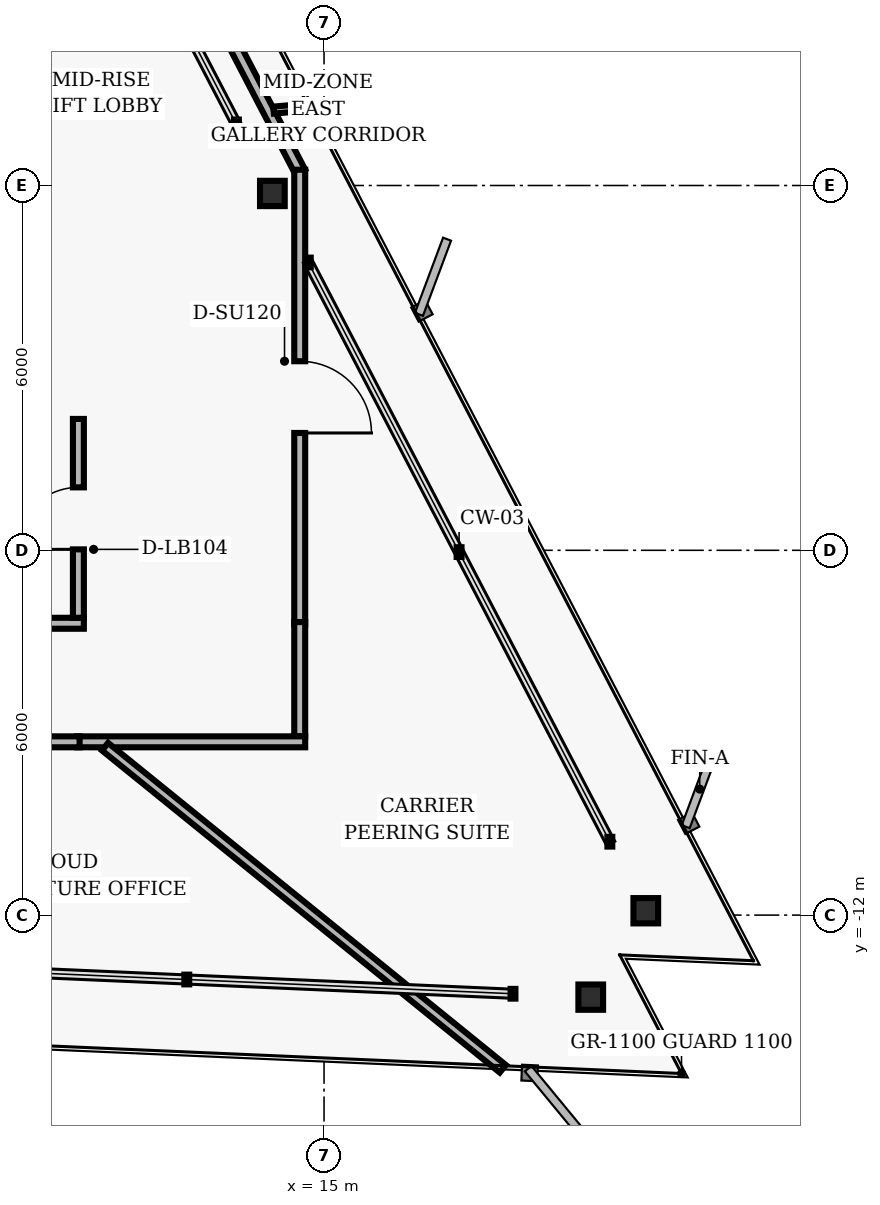
"""IFC4 building model, lengths in metres.
Left out: names, types, materials, properties, quantities, classifications, styles, units other than length and angle.
Written with IfcOpenShell. Run it as: python <this file> out.ifc"""

import sys

from ifc_helpers import new_model, si_unit, direction, frame, frame_2d, origin, origin_2d, place, context, subcontext, project, spatial, rectangle, i_section, extrude, element, fill, save


model = new_model("IFC4")
c1 = context("Model", 3, precision=1e-05, world=origin(), true_north=direction((0.0, 1.0)))
c2 = subcontext(c1, "Body", "Model", "MODEL_VIEW")
j1 = project(units=[si_unit("LENGTHUNIT", "METRE"), si_unit("PLANEANGLEUNIT", "RADIAN")], contexts=[c1])
p1 = place(None, origin())
s1 = spatial("IfcSite", under=j1, at=p1, CompositionType="ELEMENT")
p2 = place(p1, origin())
s2 = spatial("IfcBuilding", under=s1, at=p2, CompositionType="ELEMENT")
p3 = place(p2, frame((0.0, 0.0, 132.0)))
s3 = spatial("IfcBuildingStorey", under=s2, at=p3, CompositionType="ELEMENT", Elevation=132.0)
for number, where, z_axis, x_axis in (
    (1, (20.292, -11.928, 0.0), (0.0, 0.0, 1.0), (1.0, 0.0, 0.0)),
    (2, (14.15, -0.131, 0.0), (0.0, 0.0, 1.0), (1.0, 0.0, 0.0)),
    (3, (19.386, -13.349, 0.0), (0.0, 0.0, 1.0), (1.0, 0.0, 0.0)),
):
    element("IfcColumn", number, at=place(p3, frame(where, z_axis=z_axis, x_axis=x_axis)), inside=s3, PredefinedType="COLUMN", context=c2, shape_type="SweptSolid", body=[
        extrude(i_section(OverallWidth=0.406, OverallDepth=0.416, WebThickness=0.03, FlangeThickness=0.048, FilletRadius=0.02, at=origin_2d()), origin(), (0.0, 0.0, 1.0), 3.04),
    ])
p4 = place(p3, frame((10.003, 9.07, 0.0), z_axis=(0.0, 0.0, 1.0), x_axis=(0.461740291408, -0.887015165198, 0.0)))
e4 = element("IfcWall", 4, at=p4, inside=s3, PredefinedType="PARTITIONING", context=c2, shape_type="SweptSolid", body=[
    extrude(rectangle(XDim=9.976, YDim=0.18, at=frame_2d((4.988, 0.0))), origin(), (0.0, 0.0, 1.0), 2.763),
])
p5 = place(p3, frame((14.6, 0.26, 0.0), z_axis=(0.0, 0.0, 1.0), x_axis=(0.0, -1.0, 0.0)))
e5 = element("IfcWall", 5, at=p5, inside=s3, PredefinedType="PARTITIONING", context=c2, shape_type="SweptSolid", body=[
    extrude(rectangle(XDim=7.479, YDim=0.18, at=frame_2d((3.74, 0.0))), origin(), (0.0, 0.0, 1.0), 2.763),
])
p6 = place(p5, frame((3.15, 0.0, 0.0)))
e6 = element("IfcOpeningElement", 6, at=p6, cuts=e5, PredefinedType="OPENING", context=c2, shape_type="SweptSolid", body=[
    extrude(rectangle(XDim=1.18, YDim=2.02, at=frame_2d((0.59, 1.01))), frame((0.0, 0.1, 0.0), z_axis=(0.0, -1.0, 0.0), x_axis=(1.0, 0.0, 0.0)), (0.0, 0.0, 1.0), 0.2),
])
p7 = place(p3, frame((14.6, -7.18, 0.0), z_axis=(0.0, 0.0, 1.0), x_axis=(0.0, -1.0, 0.0)))
e7 = element("IfcWall", 7, at=p7, inside=s3, PredefinedType="PARTITIONING", context=c2, shape_type="SweptSolid", body=[
    extrude(rectangle(XDim=1.88, YDim=0.18, at=frame_2d((0.94, 0.0))), origin(), (0.0, 0.0, 1.0), 2.763),
])
p8 = place(p3, frame((14.69, -9.15, 0.0), z_axis=(0.0, 0.0, 1.0), x_axis=(-1.0, 0.0, 0.0)))
e8 = element("IfcWall", 8, at=p8, inside=s3, PredefinedType="PARTITIONING", context=c2, shape_type="SweptSolid", body=[
    extrude(rectangle(XDim=3.75, YDim=0.18, at=frame_2d((1.875, 0.0))), origin(), (0.0, 0.0, 1.0), 2.33),
])
p9 = place(p3, frame((10.98, -9.15, 0.0), z_axis=(0.0, 0.0, 1.0), x_axis=(-1.0, 0.0, 0.0)))
e9 = element("IfcWall", 9, at=p9, inside=s3, PredefinedType="PARTITIONING", context=c2, shape_type="SweptSolid", body=[
    extrude(rectangle(XDim=17.5, YDim=0.18, at=frame_2d((8.75, 0.0))), origin(), (0.0, 0.0, 1.0), 2.33),
])
p10 = place(p9, frame((13.116, 0.0, 0.0)))
e10 = element("IfcOpeningElement", 10, at=p10, cuts=e9, PredefinedType="OPENING", context=c2, shape_type="SweptSolid", body=[
    extrude(rectangle(XDim=1.18, YDim=2.02, at=frame_2d((0.59, 1.01))), frame((0.0, 0.1, 0.0), z_axis=(0.0, -1.0, 0.0), x_axis=(1.0, 0.0, 0.0)), (0.0, 0.0, 1.0), 0.2),
])
p11 = place(p9, frame((4.736, 0.0, 0.0)))
e11 = element("IfcOpeningElement", 11, at=p11, cuts=e9, PredefinedType="OPENING", context=c2, shape_type="SweptSolid", body=[
    extrude(rectangle(XDim=0.96, YDim=2.02, at=frame_2d((0.48, 1.01))), frame((0.0, 0.1, 0.0), z_axis=(0.0, -1.0, 0.0), x_axis=(1.0, 0.0, 0.0)), (0.0, 0.0, 1.0), 0.2),
])
p12 = place(p3, frame((5.53, -7.2, 0.0), z_axis=(0.0, 0.0, 1.0), x_axis=(1.0, 0.0, 0.0)))
e12 = element("IfcWall", 12, at=p12, inside=s3, PredefinedType="PARTITIONING", context=c2, shape_type="SweptSolid", body=[
    extrude(rectangle(XDim=5.52, YDim=0.18, at=frame_2d((2.76, 0.0))), origin(), (0.0, 0.0, 1.0), 2.33),
])
p13 = place(p3, frame((10.96, -7.11, 0.0), z_axis=(0.0, 0.0, 1.0), x_axis=(0.0, 1.0, 0.0)))
e13 = element("IfcWall", 13, at=p13, inside=s3, PredefinedType="PARTITIONING", context=c2, shape_type="SweptSolid", body=[
    extrude(rectangle(XDim=3.271, YDim=0.18, at=frame_2d((1.635, 0.0))), origin(), (0.0, 0.0, 1.0), 2.763),
])
p14 = place(p13, frame((1.125, 0.0, 0.0)))
e14 = element("IfcOpeningElement", 14, at=p14, cuts=e13, PredefinedType="OPENING", context=c2, shape_type="SweptSolid", body=[
    extrude(rectangle(XDim=1.02, YDim=2.02, at=frame_2d((0.51, 1.01))), frame((0.0, 0.1, 0.0), z_axis=(0.0, -1.0, 0.0), x_axis=(1.0, 0.0, 0.0)), (0.0, 0.0, 1.0), 0.2),
])
p15 = place(p3, frame((11.398, -9.23, 0.0), z_axis=(0.0, 0.0, 1.0), x_axis=(0.777150974354, -0.629314200588, 0.0)))
e15 = element("IfcWall", 15, at=p15, inside=s3, PredefinedType="PARTITIONING", context=c2, shape_type="SweptSolid", body=[
    extrude(rectangle(XDim=8.417, YDim=0.16, at=frame_2d((4.208, 0.0))), origin(), (0.0, 0.0, 1.0), 2.763),
])
p16 = place(p3, frame((14.169, 1.24, 0.0), z_axis=(0.0, 0.0, 1.0), x_axis=(0.996194547312, 0.08715746615, 0.0)))
e16 = element("IfcWall", 16, at=p16, inside=s3, PredefinedType="MOVABLE", context=c2, shape_type="SweptSolid", body=[
    extrude(rectangle(XDim=0.639, YDim=0.115, at=frame_2d((0.319, 0.0))), origin(), (0.0, 0.0, 1.0), 2.763),
])
p17 = place(p14, origin())
e17 = element("IfcDoor", 17, at=p17, inside=s3, OperationType="SINGLE_SWING_LEFT", PredefinedType="DOOR", context=c2, shape_type="SweptSolid", body=[
    extrude(rectangle(XDim=1.02, YDim=2.02, at=frame_2d((0.51, 1.01))), frame((0.0, 0.025, 0.0), z_axis=(0.0, -1.0, 0.0), x_axis=(1.0, 0.0, 0.0)), (0.0, 0.0, 1.0), 0.05),
])
fill(e14, e17)
p18 = place(p6, origin())
e18 = element("IfcDoor", 18, at=p18, inside=s3, OperationType="SINGLE_SWING_RIGHT", PredefinedType="DOOR", context=c2, shape_type="SweptSolid", body=[
    extrude(rectangle(XDim=1.18, YDim=2.02, at=frame_2d((0.59, 1.01))), frame((0.0, 0.025, 0.0), z_axis=(0.0, -1.0, 0.0), x_axis=(1.0, 0.0, 0.0)), (0.0, 0.0, 1.0), 0.05),
])
fill(e6, e18)
save(model, sys.argv[1])
